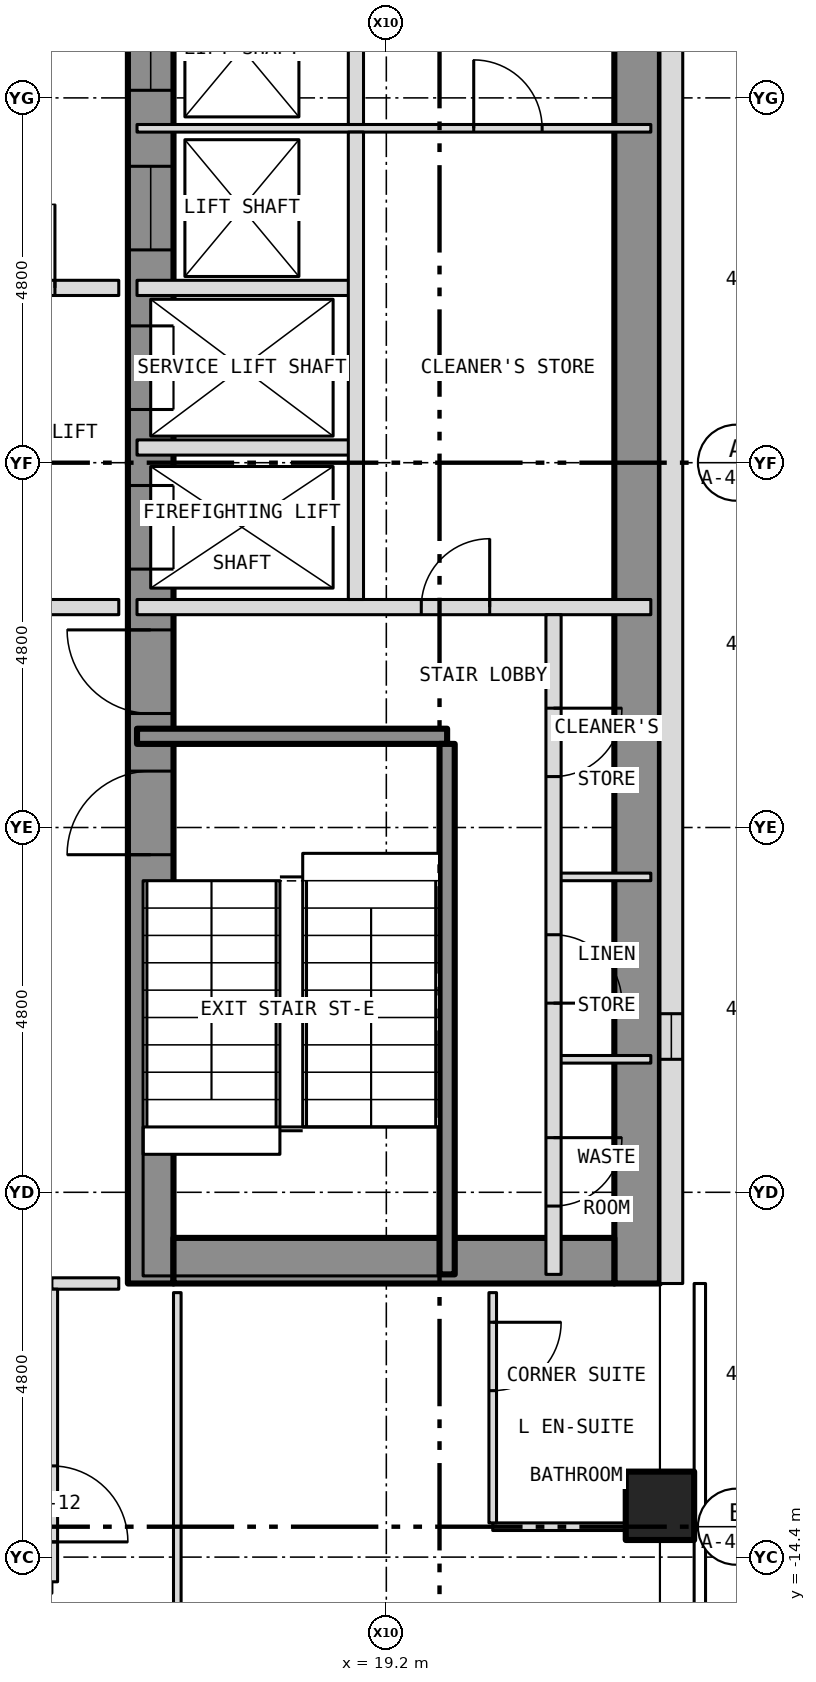
"""IFC4 building model, lengths in metres.
Left out: names, types, materials, properties, quantities, classifications, styles, units other than length and angle.
Written with IfcOpenShell. Run it as: python <this file> out.ifc"""

import sys

from ifc_helpers import new_model, si_unit, direction, frame, frame_2d, origin, origin_2d, place, context, subcontext, project, spatial, rectangle, hollow_rectangle, extrude, element, fill, save


model = new_model("IFC4")
c1 = context("Model", 3, precision=1e-05, world=origin(), true_north=direction((0.0, 1.0)))
c2 = subcontext(c1, "Body", "Model", "MODEL_VIEW")
j1 = project(units=[si_unit("LENGTHUNIT", "METRE"), si_unit("PLANEANGLEUNIT", "RADIAN")], contexts=[c1])
p1 = place(None, origin())
s1 = spatial("IfcSite", under=j1, at=p1, CompositionType="ELEMENT")
p2 = place(p1, origin())
s2 = spatial("IfcBuilding", under=s1, at=p2, CompositionType="ELEMENT")
p3 = place(p2, frame((0.0, 0.0, 92.5)))
s3 = spatial("IfcBuildingStorey", under=s2, at=p3, CompositionType="ELEMENT", Elevation=92.5)
p4 = place(p3, frame((22.8, -13.725, -0.15), z_axis=(0.0, 0.0, 1.0), x_axis=(1.0, 0.0, 0.0)))
e1 = element("IfcColumn", 1, at=p4, inside=s3, PredefinedType="COLUMN", context=c2, shape_type="SweptSolid", body=[
    extrude(hollow_rectangle(XDim=0.9, YDim=0.9, WallThickness=0.05, at=origin_2d()), origin(), (0.0, 0.0, 1.0), 3.5),
])
p5 = place(p3, frame((16.1, -10.8, 0.0), z_axis=(0.0, 0.0, 1.0), x_axis=(0.0, 1.0, 0.0)))
e2 = element("IfcWall", 2, at=p5, inside=s3, PredefinedType="SHEAR", context=c2, shape_type="SweptSolid", body=[
    extrude(rectangle(XDim=21.6, YDim=0.6, at=frame_2d((10.8, 0.0))), origin(), (0.0, 0.0, 1.0), 3.25),
])
p6 = place(p5, frame((9.4, 0.0, 0.0)))
e3 = element("IfcOpeningElement", 3, at=p6, cuts=e2, PredefinedType="OPENING", context=c2, shape_type="SweptSolid", body=[
    extrude(rectangle(XDim=1.1, YDim=2.1, at=frame_2d((0.55, 1.05))), frame((0.0, 0.312, 0.0), z_axis=(0.0, -1.0, 0.0), x_axis=(1.0, 0.0, 0.0)), (0.0, 0.0, 1.0), 0.624),
])
p7 = place(p5, frame((11.5, 0.0, 0.0)))
e4 = element("IfcOpeningElement", 4, at=p7, cuts=e2, PredefinedType="OPENING", context=c2, shape_type="SweptSolid", body=[
    extrude(rectangle(XDim=1.1, YDim=2.1, at=frame_2d((0.55, 1.05))), frame((0.0, 0.312, 0.0), z_axis=(0.0, -1.0, 0.0), x_axis=(1.0, 0.0, 0.0)), (0.0, 0.0, 1.0), 0.624),
])
p8 = place(p5, frame((13.6, 0.0, 0.0)))
e5 = element("IfcOpeningElement", 5, at=p8, cuts=e2, PredefinedType="OPENING", context=c2, shape_type="SweptSolid", body=[
    extrude(rectangle(XDim=1.1, YDim=2.1, at=frame_2d((0.55, 1.05))), frame((0.0, 0.312, 0.0), z_axis=(0.0, -1.0, 0.0), x_axis=(1.0, 0.0, 0.0)), (0.0, 0.0, 1.0), 0.624),
])
p9 = place(p5, frame((15.7, 0.0, 0.0)))
e6 = element("IfcOpeningElement", 6, at=p9, cuts=e2, PredefinedType="OPENING", context=c2, shape_type="SweptSolid", body=[
    extrude(rectangle(XDim=1.1, YDim=2.1, at=frame_2d((0.55, 1.05))), frame((0.0, 0.312, 0.0), z_axis=(0.0, -1.0, 0.0), x_axis=(1.0, 0.0, 0.0)), (0.0, 0.0, 1.0), 0.624),
])
p10 = place(p5, frame((17.8, 0.0, 0.0)))
e7 = element("IfcOpeningElement", 7, at=p10, cuts=e2, PredefinedType="OPENING", context=c2, shape_type="SweptSolid", body=[
    extrude(rectangle(XDim=1.1, YDim=2.1, at=frame_2d((0.55, 1.05))), frame((0.0, 0.312, 0.0), z_axis=(0.0, -1.0, 0.0), x_axis=(1.0, 0.0, 0.0)), (0.0, 0.0, 1.0), 0.624),
])
p11 = place(p5, frame((5.642, 0.0, 0.0)))
e8 = element("IfcOpeningElement", 8, at=p11, cuts=e2, PredefinedType="OPENING", context=c2, shape_type="SweptSolid", body=[
    extrude(rectangle(XDim=1.1, YDim=2.1, at=frame_2d((0.55, 1.05))), frame((0.0, 0.312, 0.0), z_axis=(0.0, -1.0, 0.0), x_axis=(1.0, 0.0, 0.0)), (0.0, 0.0, 1.0), 0.624),
])
p12 = place(p5, frame((7.5, 0.0, 0.0)))
e9 = element("IfcOpeningElement", 9, at=p12, cuts=e2, PredefinedType="OPENING", context=c2, shape_type="SweptSolid", body=[
    extrude(rectangle(XDim=1.1, YDim=2.1, at=frame_2d((0.55, 1.05))), frame((0.0, 0.312, 0.0), z_axis=(0.0, -1.0, 0.0), x_axis=(1.0, 0.0, 0.0)), (0.0, 0.0, 1.0), 0.624),
])
p13 = place(p3, frame((22.5, -10.8, 0.0), z_axis=(0.0, 0.0, 1.0), x_axis=(0.0, 1.0, 0.0)))
e10 = element("IfcWall", 10, at=p13, inside=s3, PredefinedType="SHEAR", context=c2, shape_type="SweptSolid", body=[
    extrude(rectangle(XDim=21.6, YDim=0.6, at=frame_2d((10.8, 0.0))), origin(), (0.0, 0.0, 1.0), 3.25),
])
p14 = place(p3, frame((16.4, -10.5, 0.0), z_axis=(0.0, 0.0, 1.0), x_axis=(1.0, 0.0, 0.0)))
e11 = element("IfcWall", 11, at=p14, inside=s3, PredefinedType="SHEAR", context=c2, shape_type="SweptSolid", body=[
    extrude(rectangle(XDim=5.8, YDim=0.6, at=frame_2d((2.9, 0.0))), origin(), (0.0, 0.0, 1.0), 3.25),
])
p15 = place(p3, frame((22.95, -10.8, 0.0), z_axis=(0.0, 0.0, 1.0), x_axis=(0.0, 1.0, 0.0)))
e12 = element("IfcWall", 12, at=p15, inside=s3, PredefinedType="SOLIDWALL", context=c2, shape_type="SweptSolid", body=[
    extrude(rectangle(XDim=21.6, YDim=0.3, at=frame_2d((10.8, 0.0))), origin(), (0.0, 0.0, 1.0), 3.5),
])
p16 = place(p15, frame((2.95, 0.0, 1.0)))
e13 = element("IfcOpeningElement", 13, at=p16, cuts=e12, PredefinedType="OPENING", context=c2, shape_type="SweptSolid", body=[
    extrude(rectangle(XDim=0.6, YDim=1.5, at=frame_2d((0.3, 0.75))), frame((0.0, 0.162, 0.0), z_axis=(0.0, -1.0, 0.0), x_axis=(1.0, 0.0, 0.0)), (0.0, 0.0, 1.0), 0.324),
])
p17 = place(p3, frame((20.6, -14.0, 0.0), z_axis=(0.0, 0.0, 1.0), x_axis=(1.0, 0.0, 0.0)))
e14 = element("IfcWall", 14, at=p17, inside=s3, PredefinedType="PARTITIONING", context=c2, shape_type="SweptSolid", body=[
    extrude(rectangle(XDim=2.08, YDim=0.1, at=frame_2d((1.04, 0.0))), origin(), (0.0, 0.0, 1.0), 3.35),
])
p18 = place(p3, frame((14.8, -10.8, 0.0), z_axis=(0.0, 0.0, 1.0), x_axis=(1.0, 0.0, 0.0)))
e15 = element("IfcWall", 15, at=p18, inside=s3, PredefinedType="PARTITIONING", context=c2, shape_type="SweptSolid", body=[
    extrude(rectangle(XDim=0.88, YDim=0.15, at=frame_2d((0.44, 0.0))), origin(), (0.0, 0.0, 1.0), 3.35),
])
for number, where, z_axis, x_axis in (
    (16, (21.4, -7.85, 0.0), (0.0, 0.0, 1.0), (1.0, 0.0, 0.0)),
    (17, (21.4, -5.45, 0.0), (0.0, 0.0, 1.0), (1.0, 0.0, 0.0)),
):
    element("IfcWall", number, at=place(p3, frame(where, z_axis=z_axis, x_axis=x_axis)), inside=s3, PredefinedType="PARTITIONING", context=c2, shape_type="SweptSolid", body=[
        extrude(rectangle(XDim=1.28, YDim=0.1, at=frame_2d((0.64, 0.0))), origin(), (0.0, 0.0, 1.0), 3.25),
    ])
p19 = place(p3, frame((15.92, -3.6, 0.0), z_axis=(0.0, 0.0, 1.0), x_axis=(1.0, 0.0, 0.0)))
e18 = element("IfcWall", 18, at=p19, inside=s3, PredefinedType="SHEAR", context=c2, shape_type="SweptSolid", body=[
    extrude(rectangle(XDim=4.08, YDim=0.2, at=frame_2d((2.04, 0.0))), origin(), (0.0, 0.0, 1.0), 3.25),
])
p20 = place(p3, frame((12.4, -1.9, 0.0), z_axis=(0.0, 0.0, 1.0), x_axis=(1.0, 0.0, 0.0)))
e19 = element("IfcWall", 19, at=p20, inside=s3, PredefinedType="PARTITIONING", context=c2, shape_type="SweptSolid", body=[
    extrude(rectangle(XDim=3.28, YDim=0.2, at=frame_2d((1.64, 0.0))), origin(), (0.0, 0.0, 1.0), 3.35),
])
p21 = place(p20, frame((1.24, 0.0, 0.0)))
e20 = element("IfcOpeningElement", 20, at=p21, cuts=e19, PredefinedType="OPENING", context=c2, shape_type="SweptSolid", body=[
    extrude(rectangle(XDim=1.1, YDim=2.1, at=frame_2d((0.55, 1.05))), frame((0.0, 0.112, 0.0), z_axis=(0.0, -1.0, 0.0), x_axis=(1.0, 0.0, 0.0)), (0.0, 0.0, 1.0), 0.224),
])
p22 = place(p3, frame((15.92, -1.9, 0.0), z_axis=(0.0, 0.0, 1.0), x_axis=(1.0, 0.0, 0.0)))
e21 = element("IfcWall", 21, at=p22, inside=s3, PredefinedType="PARTITIONING", context=c2, shape_type="SweptSolid", body=[
    extrude(rectangle(XDim=6.76, YDim=0.2, at=frame_2d((3.38, 0.0))), origin(), (0.0, 0.0, 1.0), 3.25),
])
p23 = place(p22, frame((3.74, 0.0, 0.0)))
e22 = element("IfcOpeningElement", 22, at=p23, cuts=e21, PredefinedType="OPENING", context=c2, shape_type="SweptSolid", body=[
    extrude(rectangle(XDim=0.9, YDim=2.1, at=frame_2d((0.45, 1.05))), frame((0.0, 0.112, 0.0), z_axis=(0.0, -1.0, 0.0), x_axis=(1.0, 0.0, 0.0)), (0.0, 0.0, 1.0), 0.224),
])
p24 = place(p3, frame((15.92, 0.2, 0.0), z_axis=(0.0, 0.0, 1.0), x_axis=(1.0, 0.0, 0.0)))
e23 = element("IfcWall", 23, at=p24, inside=s3, PredefinedType="PARTITIONING", context=c2, shape_type="SweptSolid", body=[
    extrude(rectangle(XDim=2.88, YDim=0.2, at=frame_2d((1.44, 0.0))), origin(), (0.0, 0.0, 1.0), 3.25),
])
p25 = place(p3, frame((12.4, 2.3, 0.0), z_axis=(0.0, 0.0, 1.0), x_axis=(1.0, 0.0, 0.0)))
e24 = element("IfcWall", 24, at=p25, inside=s3, PredefinedType="PARTITIONING", context=c2, shape_type="SweptSolid", body=[
    extrude(rectangle(XDim=3.28, YDim=0.2, at=frame_2d((1.64, 0.0))), origin(), (0.0, 0.0, 1.0), 3.35),
])
p26 = place(p25, frame((1.34, 0.0, 0.0)))
e25 = element("IfcOpeningElement", 25, at=p26, cuts=e24, PredefinedType="OPENING", context=c2, shape_type="SweptSolid", body=[
    extrude(rectangle(XDim=1.1, YDim=2.1, at=frame_2d((0.55, 1.05))), frame((0.0, 0.112, 0.0), z_axis=(0.0, -1.0, 0.0), x_axis=(1.0, 0.0, 0.0)), (0.0, 0.0, 1.0), 0.224),
])
p27 = place(p3, frame((15.92, 2.3, 0.0), z_axis=(0.0, 0.0, 1.0), x_axis=(1.0, 0.0, 0.0)))
e26 = element("IfcWall", 26, at=p27, inside=s3, PredefinedType="PARTITIONING", context=c2, shape_type="SweptSolid", body=[
    extrude(rectangle(XDim=2.88, YDim=0.2, at=frame_2d((1.44, 0.0))), origin(), (0.0, 0.0, 1.0), 3.25),
])
p28 = place(p3, frame((15.92, 4.4, 0.0), z_axis=(0.0, 0.0, 1.0), x_axis=(1.0, 0.0, 0.0)))
e27 = element("IfcWall", 27, at=p28, inside=s3, PredefinedType="PARTITIONING", context=c2, shape_type="SweptSolid", body=[
    extrude(rectangle(XDim=6.76, YDim=0.1, at=frame_2d((3.38, 0.0))), origin(), (0.0, 0.0, 1.0), 3.25),
])
p29 = place(p28, frame((4.43, 0.0, 0.0)))
e28 = element("IfcOpeningElement", 28, at=p29, cuts=e27, PredefinedType="OPENING", context=c2, shape_type="SweptSolid", body=[
    extrude(rectangle(XDim=0.9, YDim=2.1, at=frame_2d((0.45, 1.05))), frame((0.0, 0.062, 0.0), z_axis=(0.0, -1.0, 0.0), x_axis=(1.0, 0.0, 0.0)), (0.0, 0.0, 1.0), 0.124),
])
p30 = place(p3, frame((14.8, -14.725, 0.0), z_axis=(0.0, 0.0, 1.0), x_axis=(0.0, 1.0, 0.0)))
e29 = element("IfcWall", 29, at=p30, inside=s3, PredefinedType="PARTITIONING", context=c2, shape_type="SweptSolid", body=[
    extrude(rectangle(XDim=3.85, YDim=0.15, at=frame_2d((1.925, 0.0))), origin(), (0.0, 0.0, 1.0), 3.35),
])
p31 = place(p30, frame((0.525, 0.0, 0.0)))
e30 = element("IfcOpeningElement", 30, at=p31, cuts=e29, PredefinedType="OPENING", context=c2, shape_type="SweptSolid", body=[
    extrude(rectangle(XDim=1.0, YDim=2.1, at=frame_2d((0.5, 1.05))), frame((0.0, 0.087, 0.0), z_axis=(0.0, -1.0, 0.0), x_axis=(1.0, 0.0, 0.0)), (0.0, 0.0, 1.0), 0.174),
])
p32 = place(p3, frame((16.45, -23.28, 0.0), z_axis=(0.0, 0.0, 1.0), x_axis=(0.0, 1.0, 0.0)))
e31 = element("IfcWall", 31, at=p32, inside=s3, PredefinedType="PARTITIONING", context=c2, shape_type="SweptSolid", body=[
    extrude(rectangle(XDim=12.36, YDim=0.1, at=frame_2d((6.18, 0.0))), origin(), (0.0, 0.0, 1.0), 3.35),
])
p33 = place(p32, frame((6.03, 0.0, 0.0)))
e32 = element("IfcOpeningElement", 32, at=p33, cuts=e31, PredefinedType="OPENING", context=c2, shape_type="SweptSolid", body=[
    extrude(rectangle(XDim=0.9, YDim=2.1, at=frame_2d((0.45, 1.05))), frame((0.0, 0.062, 0.0), z_axis=(0.0, -1.0, 0.0), x_axis=(1.0, 0.0, 0.0)), (0.0, 0.0, 1.0), 0.124),
])
p34 = place(p3, frame((18.8, -1.8, 0.0), z_axis=(0.0, 0.0, 1.0), x_axis=(0.0, 1.0, 0.0)))
e33 = element("IfcWall", 33, at=p34, inside=s3, PredefinedType="PARTITIONING", context=c2, shape_type="SweptSolid", body=[
    extrude(rectangle(XDim=6.15, YDim=0.2, at=frame_2d((3.075, 0.0))), origin(), (0.0, 0.0, 1.0), 3.25),
])
p35 = place(p3, frame((18.8, 4.45, 0.0), z_axis=(0.0, 0.0, 1.0), x_axis=(0.0, 1.0, 0.0)))
e34 = element("IfcWall", 34, at=p35, inside=s3, PredefinedType="PARTITIONING", context=c2, shape_type="SweptSolid", body=[
    extrude(rectangle(XDim=6.23, YDim=0.2, at=frame_2d((3.115, 0.0))), origin(), (0.0, 0.0, 1.0), 3.25),
])
p36 = place(p3, frame((20.0, -10.68, 0.0), z_axis=(0.0, 0.0, 1.0), x_axis=(0.0, 1.0, 0.0)))
e35 = element("IfcWall", 35, at=p36, inside=s3, PredefinedType="SHEAR", context=c2, shape_type="SweptSolid", body=[
    extrude(rectangle(XDim=6.98, YDim=0.2, at=frame_2d((3.49, 0.0))), origin(), (0.0, 0.0, 1.0), 3.25),
])
p37 = place(p3, frame((20.6, -13.95, 0.0), z_axis=(0.0, 0.0, 1.0), x_axis=(0.0, 1.0, 0.0)))
e36 = element("IfcWall", 36, at=p37, inside=s3, PredefinedType="PARTITIONING", context=c2, shape_type="SweptSolid", body=[
    extrude(rectangle(XDim=3.03, YDim=0.1, at=frame_2d((1.515, 0.0))), origin(), (0.0, 0.0, 1.0), 3.35),
])
p38 = place(p37, frame((1.74, 0.0, 0.0)))
e37 = element("IfcOpeningElement", 37, at=p38, cuts=e36, PredefinedType="OPENING", context=c2, shape_type="SweptSolid", body=[
    extrude(rectangle(XDim=0.9, YDim=2.1, at=frame_2d((0.45, 1.05))), frame((0.0, 0.062, 0.0), z_axis=(0.0, -1.0, 0.0), x_axis=(1.0, 0.0, 0.0)), (0.0, 0.0, 1.0), 0.124),
])
p39 = place(p3, frame((21.4, -10.68, 0.0), z_axis=(0.0, 0.0, 1.0), x_axis=(0.0, 1.0, 0.0)))
e38 = element("IfcWall", 38, at=p39, inside=s3, PredefinedType="PARTITIONING", context=c2, shape_type="SweptSolid", body=[
    extrude(rectangle(XDim=8.68, YDim=0.2, at=frame_2d((4.34, 0.0))), origin(), (0.0, 0.0, 1.0), 3.25),
])
p40 = place(p39, frame((0.899, 0.0, 0.0)))
e39 = element("IfcOpeningElement", 39, at=p40, cuts=e38, PredefinedType="OPENING", context=c2, shape_type="SweptSolid", body=[
    extrude(rectangle(XDim=0.9, YDim=2.1, at=frame_2d((0.45, 1.05))), frame((0.0, 0.112, 0.0), z_axis=(0.0, -1.0, 0.0), x_axis=(1.0, 0.0, 0.0)), (0.0, 0.0, 1.0), 0.224),
])
p41 = place(p39, frame((3.569, 0.0, 0.0)))
e40 = element("IfcOpeningElement", 40, at=p41, cuts=e38, PredefinedType="OPENING", context=c2, shape_type="SweptSolid", body=[
    extrude(rectangle(XDim=0.9, YDim=2.1, at=frame_2d((0.45, 1.05))), frame((0.0, 0.112, 0.0), z_axis=(0.0, -1.0, 0.0), x_axis=(1.0, 0.0, 0.0)), (0.0, 0.0, 1.0), 0.224),
])
p42 = place(p39, frame((6.55, 0.0, 0.0)))
e41 = element("IfcOpeningElement", 41, at=p42, cuts=e38, PredefinedType="OPENING", context=c2, shape_type="SweptSolid", body=[
    extrude(rectangle(XDim=0.9, YDim=2.1, at=frame_2d((0.45, 1.05))), frame((0.0, 0.112, 0.0), z_axis=(0.0, -1.0, 0.0), x_axis=(1.0, 0.0, 0.0)), (0.0, 0.0, 1.0), 0.224),
])
p43 = place(p16, origin())
e42 = element("IfcWindow", 42, at=p43, inside=s3, PartitioningType="SINGLE_PANEL", PredefinedType="WINDOW", context=c2, shape_type="SweptSolid", body=[
    extrude(rectangle(XDim=0.6, YDim=1.5, at=frame_2d((0.3, 0.75))), frame((0.0, -0.06, 0.0), z_axis=(0.0, -1.0, 0.0), x_axis=(1.0, 0.0, 0.0)), (0.0, 0.0, 1.0), 0.06),
])
fill(e13, e42)
p44 = place(p6, origin())
e43 = element("IfcDoor", 43, at=p44, inside=s3, OperationType="SLIDING_TO_LEFT", PredefinedType="DOOR", context=c2, shape_type="SweptSolid", body=[
    extrude(rectangle(XDim=1.1, YDim=2.1, at=frame_2d((0.55, 1.05))), frame((0.0, 0.025, 0.0), z_axis=(0.0, -1.0, 0.0), x_axis=(1.0, 0.0, 0.0)), (0.0, 0.0, 1.0), 0.05),
])
fill(e3, e43)
p45 = place(p7, origin())
e44 = element("IfcDoor", 44, at=p45, inside=s3, OperationType="SLIDING_TO_LEFT", PredefinedType="DOOR", context=c2, shape_type="SweptSolid", body=[
    extrude(rectangle(XDim=1.1, YDim=2.1, at=frame_2d((0.55, 1.05))), frame((0.0, 0.025, 0.0), z_axis=(0.0, -1.0, 0.0), x_axis=(1.0, 0.0, 0.0)), (0.0, 0.0, 1.0), 0.05),
])
fill(e4, e44)
p46 = place(p8, origin())
e45 = element("IfcDoor", 45, at=p46, inside=s3, OperationType="SLIDING_TO_LEFT", PredefinedType="DOOR", context=c2, shape_type="SweptSolid", body=[
    extrude(rectangle(XDim=1.1, YDim=2.1, at=frame_2d((0.55, 1.05))), frame((0.0, 0.025, 0.0), z_axis=(0.0, -1.0, 0.0), x_axis=(1.0, 0.0, 0.0)), (0.0, 0.0, 1.0), 0.05),
])
fill(e5, e45)
p47 = place(p9, origin())
e46 = element("IfcDoor", 46, at=p47, inside=s3, OperationType="SLIDING_TO_LEFT", PredefinedType="DOOR", context=c2, shape_type="SweptSolid", body=[
    extrude(rectangle(XDim=1.1, YDim=2.1, at=frame_2d((0.55, 1.05))), frame((0.0, 0.025, 0.0), z_axis=(0.0, -1.0, 0.0), x_axis=(1.0, 0.0, 0.0)), (0.0, 0.0, 1.0), 0.05),
])
fill(e6, e46)
p48 = place(p11, origin())
e47 = element("IfcDoor", 47, at=p48, inside=s3, OperationType="SINGLE_SWING_LEFT", PredefinedType="DOOR", context=c2, shape_type="SweptSolid", body=[
    extrude(rectangle(XDim=1.1, YDim=2.1, at=frame_2d((0.55, 1.05))), frame((0.0, 0.025, 0.0), z_axis=(0.0, -1.0, 0.0), x_axis=(1.0, 0.0, 0.0)), (0.0, 0.0, 1.0), 0.05),
])
fill(e8, e47)
p49 = place(p12, origin())
e48 = element("IfcDoor", 48, at=p49, inside=s3, OperationType="SINGLE_SWING_RIGHT", PredefinedType="DOOR", context=c2, shape_type="SweptSolid", body=[
    extrude(rectangle(XDim=1.1, YDim=2.1, at=frame_2d((0.55, 1.05))), frame((0.0, 0.025, 0.0), z_axis=(0.0, -1.0, 0.0), x_axis=(1.0, 0.0, 0.0)), (0.0, 0.0, 1.0), 0.05),
])
fill(e9, e48)
p50 = place(p40, origin())
e49 = element("IfcDoor", 49, at=p50, inside=s3, OperationType="SINGLE_SWING_RIGHT", PredefinedType="DOOR", context=c2, shape_type="SweptSolid", body=[
    extrude(rectangle(XDim=0.9, YDim=2.1, at=frame_2d((0.45, 1.05))), frame((0.0, 0.025, 0.0), z_axis=(0.0, -1.0, 0.0), x_axis=(1.0, 0.0, 0.0)), (0.0, 0.0, 1.0), 0.05),
])
fill(e39, e49)
p51 = place(p41, origin())
e50 = element("IfcDoor", 50, at=p51, inside=s3, OperationType="SINGLE_SWING_LEFT", PredefinedType="DOOR", context=c2, shape_type="SweptSolid", body=[
    extrude(rectangle(XDim=0.9, YDim=2.1, at=frame_2d((0.45, 1.05))), frame((0.0, 0.025, 0.0), z_axis=(0.0, -1.0, 0.0), x_axis=(1.0, 0.0, 0.0)), (0.0, 0.0, 1.0), 0.05),
])
fill(e40, e50)
p52 = place(p42, origin())
e51 = element("IfcDoor", 51, at=p52, inside=s3, OperationType="SINGLE_SWING_RIGHT", PredefinedType="DOOR", context=c2, shape_type="SweptSolid", body=[
    extrude(rectangle(XDim=0.9, YDim=2.1, at=frame_2d((0.45, 1.05))), frame((0.0, 0.025, 0.0), z_axis=(0.0, -1.0, 0.0), x_axis=(1.0, 0.0, 0.0)), (0.0, 0.0, 1.0), 0.05),
])
fill(e41, e51)
p53 = place(p23, origin())
e52 = element("IfcDoor", 52, at=p53, inside=s3, OperationType="SINGLE_SWING_RIGHT", PredefinedType="DOOR", context=c2, shape_type="SweptSolid", body=[
    extrude(rectangle(XDim=0.9, YDim=2.1, at=frame_2d((0.45, 1.05))), frame((0.0, 0.025, 0.0), z_axis=(0.0, -1.0, 0.0), x_axis=(1.0, 0.0, 0.0)), (0.0, 0.0, 1.0), 0.05),
])
fill(e22, e52)
p54 = place(p29, origin())
e53 = element("IfcDoor", 53, at=p54, inside=s3, OperationType="SINGLE_SWING_LEFT", PredefinedType="DOOR", context=c2, shape_type="SweptSolid", body=[
    extrude(rectangle(XDim=0.9, YDim=2.1, at=frame_2d((0.45, 1.05))), frame((0.0, 0.025, 0.0), z_axis=(0.0, -1.0, 0.0), x_axis=(1.0, 0.0, 0.0)), (0.0, 0.0, 1.0), 0.05),
])
fill(e28, e53)
p55 = place(p26, origin())
e54 = element("IfcDoor", 54, at=p55, inside=s3, OperationType="SINGLE_SWING_RIGHT", PredefinedType="DOOR", context=c2, shape_type="SweptSolid", body=[
    extrude(rectangle(XDim=1.1, YDim=2.1, at=frame_2d((0.55, 1.05))), frame((0.0, 0.025, 0.0), z_axis=(0.0, -1.0, 0.0), x_axis=(1.0, 0.0, 0.0)), (0.0, 0.0, 1.0), 0.05),
])
fill(e25, e54)
p56 = place(p31, origin())
e55 = element("IfcDoor", 55, at=p56, inside=s3, OperationType="SINGLE_SWING_LEFT", PredefinedType="DOOR", context=c2, shape_type="SweptSolid", body=[
    extrude(rectangle(XDim=1.0, YDim=2.1, at=frame_2d((0.5, 1.05))), frame((0.0, 0.025, 0.0), z_axis=(0.0, -1.0, 0.0), x_axis=(1.0, 0.0, 0.0)), (0.0, 0.0, 1.0), 0.05),
])
fill(e30, e55)
p57 = place(p38, origin())
e56 = element("IfcDoor", 56, at=p57, inside=s3, OperationType="SINGLE_SWING_RIGHT", PredefinedType="DOOR", context=c2, shape_type="SweptSolid", body=[
    extrude(rectangle(XDim=0.9, YDim=2.1, at=frame_2d((0.45, 1.05))), frame((0.0, 0.025, 0.0), z_axis=(0.0, -1.0, 0.0), x_axis=(1.0, 0.0, 0.0)), (0.0, 0.0, 1.0), 0.05),
])
fill(e37, e56)
save(model, sys.argv[1])
